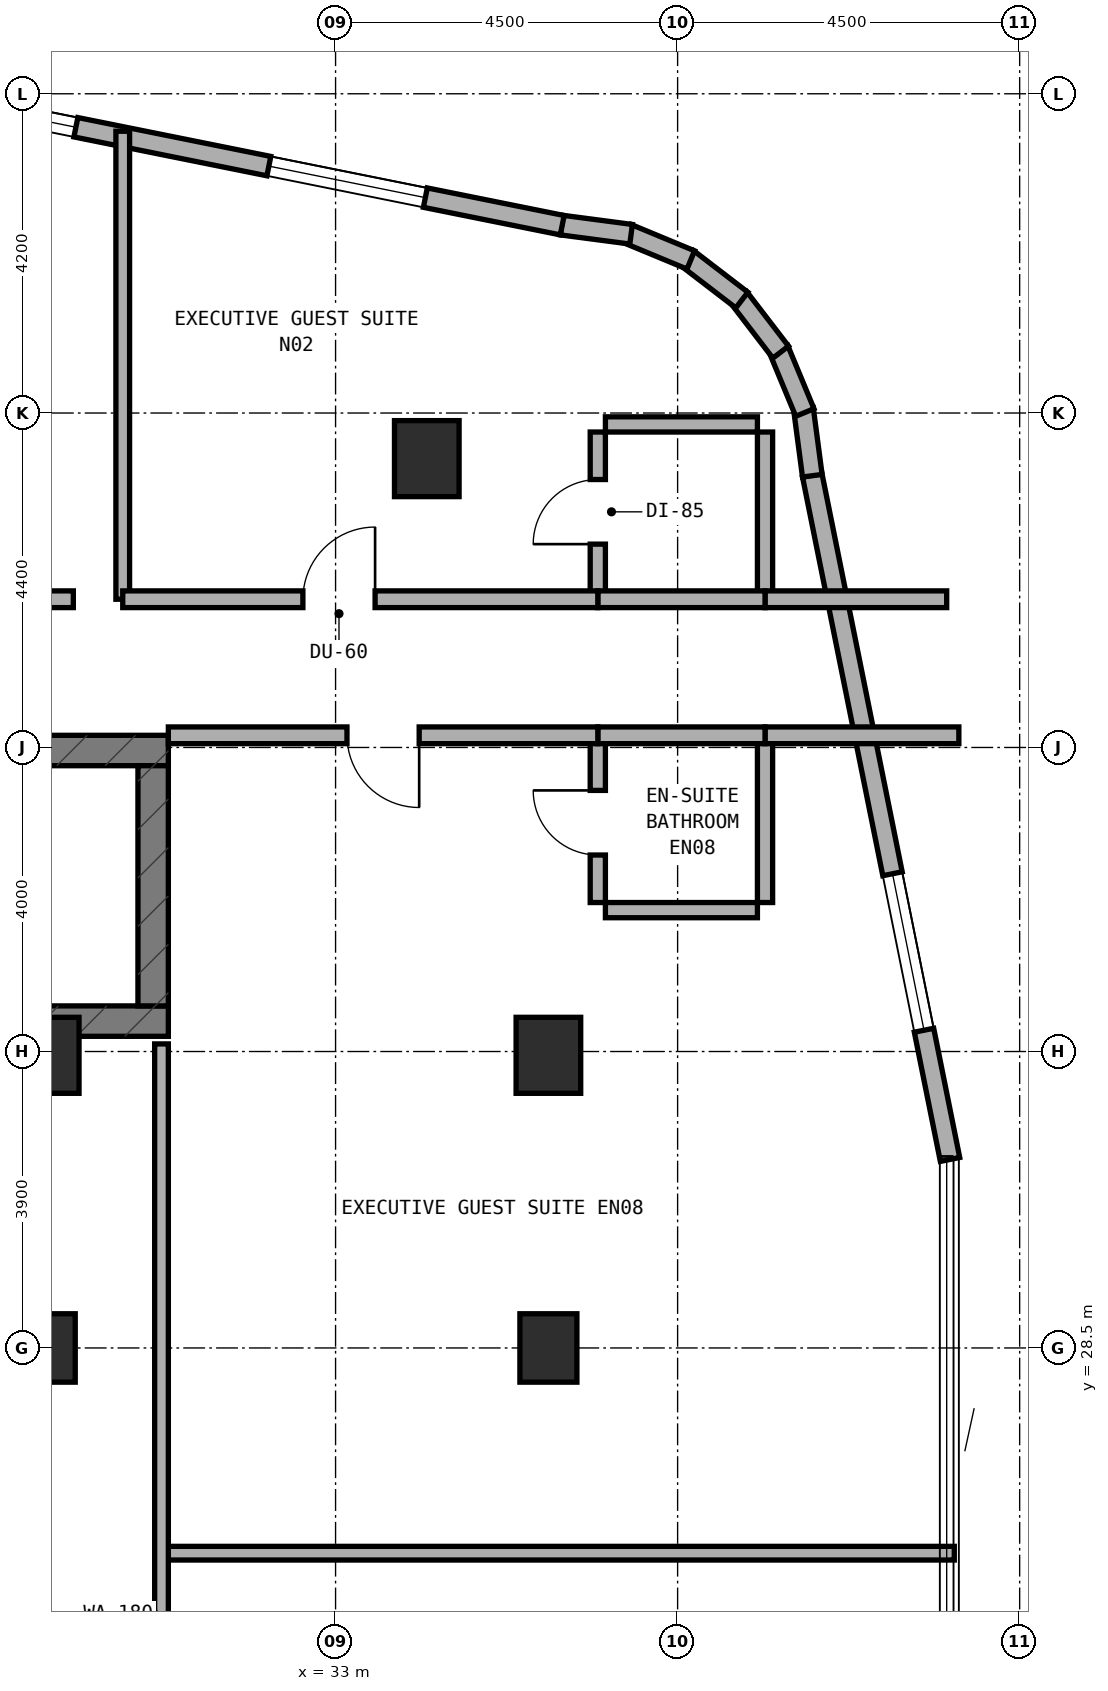
"""IFC4 building model, lengths in metres.
Left out: names, types, materials, properties, quantities, classifications, styles, units other than length and angle.
Written with IfcOpenShell. Run it as: python <this file> out.ifc"""

import sys

from ifc_helpers import new_model, si_unit, direction, frame, frame_2d, origin, origin_2d, place, context, subcontext, project, spatial, rectangle, extrude, element, fill, save


model = new_model("IFC4")
c1 = context("Model", 3, precision=1e-05, world=origin(), true_north=direction((0.0, 1.0)))
c2 = subcontext(c1, "Body", "Model", "MODEL_VIEW")
j1 = project(units=[si_unit("LENGTHUNIT", "METRE"), si_unit("PLANEANGLEUNIT", "RADIAN")], contexts=[c1])
p1 = place(None, origin())
s1 = spatial("IfcSite", under=j1, at=p1, CompositionType="ELEMENT")
p2 = place(p1, origin())
s2 = spatial("IfcBuilding", under=s1, at=p2, CompositionType="ELEMENT")
p3 = place(p2, frame((0.0, 0.0, 169.5)))
s3 = spatial("IfcBuildingStorey", under=s2, at=p3, CompositionType="ELEMENT", Elevation=169.5)
p4 = place(p3, frame((6.4, 32.8, 0.0), z_axis=(0.0, 0.0, 1.0), x_axis=(1.0, 0.0, 0.0)))
e1 = element("IfcWall", 1, at=p4, inside=s3, PredefinedType="SHEAR", context=c2, shape_type="SweptSolid", body=[
    extrude(rectangle(XDim=24.4, YDim=0.4, at=frame_2d((12.2, 0.0))), origin(), (0.0, 0.0, 1.0), 3.5),
])
p5 = place(p4, frame((6.05, 0.0, 0.0)))
e2 = element("IfcOpeningElement", 2, at=p5, cuts=e1, PredefinedType="OPENING", context=c2, shape_type="SweptSolid", body=[
    extrude(rectangle(XDim=1.1, YDim=2.15, at=frame_2d((0.55, 1.075))), frame((0.0, 0.21, 0.0), z_axis=(0.0, -1.0, 0.0), x_axis=(1.0, 0.0, 0.0)), (0.0, 0.0, 1.0), 0.42),
])
p6 = place(p3, frame((6.4, 36.36, 0.0), z_axis=(0.0, 0.0, 1.0), x_axis=(1.0, 0.0, 0.0)))
e3 = element("IfcWall", 3, at=p6, inside=s3, PredefinedType="SHEAR", context=c2, shape_type="SweptSolid", body=[
    extrude(rectangle(XDim=24.4, YDim=0.4, at=frame_2d((12.2, 0.0))), origin(), (0.0, 0.0, 1.0), 3.5),
])
p7 = place(p6, frame((9.15, 0.0, 0.0)))
e4 = element("IfcOpeningElement", 4, at=p7, cuts=e3, PredefinedType="OPENING", context=c2, shape_type="SweptSolid", body=[
    extrude(rectangle(XDim=1.2, YDim=2.15, at=frame_2d((0.6, 1.075))), frame((0.0, 0.21, 0.0), z_axis=(0.0, -1.0, 0.0), x_axis=(1.0, 0.0, 0.0)), (0.0, 0.0, 1.0), 0.42),
])
p8 = place(p6, frame((19.2, 0.0, 0.0)))
e5 = element("IfcOpeningElement", 5, at=p8, cuts=e3, PredefinedType="OPENING", context=c2, shape_type="SweptSolid", body=[
    extrude(rectangle(XDim=0.85, YDim=2.1, at=frame_2d((0.425, 1.05))), frame((0.0, 0.21, 0.0), z_axis=(0.0, -1.0, 0.0), x_axis=(1.0, 0.0, 0.0)), (0.0, 0.0, 1.0), 0.42),
])
p9 = place(p6, frame((16.94, 0.0, 0.0)))
e6 = element("IfcOpeningElement", 6, at=p9, cuts=e3, PredefinedType="OPENING", context=c2, shape_type="SweptSolid", body=[
    extrude(rectangle(XDim=0.85, YDim=2.1, at=frame_2d((0.425, 1.05))), frame((0.0, 0.21, 0.0), z_axis=(0.0, -1.0, 0.0), x_axis=(1.0, 0.0, 0.0)), (0.0, 0.0, 1.0), 0.42),
])
p10 = place(p3, frame((30.6, 33.0, 0.0), z_axis=(0.0, 0.0, 1.0), x_axis=(0.0, 1.0, 0.0)))
e7 = element("IfcWall", 7, at=p10, inside=s3, PredefinedType="SHEAR", context=c2, shape_type="SweptSolid", body=[
    extrude(rectangle(XDim=3.16, YDim=0.4, at=frame_2d((1.58, 0.0))), origin(), (0.0, 0.0, 1.0), 3.5),
])
p11 = place(p3, frame((34.2, 40.2, 0.0), z_axis=(0.0, 0.0, 1.0), x_axis=(1.0, 0.0, 0.0)))
e8 = element("IfcColumn", 8, at=p11, inside=s3, PredefinedType="COLUMN", context=c2, shape_type="SweptSolid", body=[
    extrude(rectangle(XDim=0.85, YDim=1.0, at=origin_2d()), origin(), (0.0, 0.0, 1.0), 3.5),
])
p12 = place(p3, frame((35.8, 28.5, 0.0), z_axis=(0.0, 0.0, 1.0), x_axis=(1.0, 0.0, 0.0)))
e9 = element("IfcColumn", 9, at=p12, inside=s3, PredefinedType="COLUMN", context=c2, shape_type="SweptSolid", body=[
    extrude(rectangle(XDim=0.75, YDim=0.9, at=origin_2d()), origin(), (0.0, 0.0, 1.0), 3.5),
])
for number, where, z_axis, x_axis in (
    (10, (35.8, 32.35, 0.0), (0.0, 0.0, 1.0), (1.0, 0.0, 0.0)),
    (11, (29.2, 32.35, 0.0), (0.0, 0.0, 1.0), (1.0, 0.0, 0.0)),
):
    element("IfcColumn", number, at=place(p3, frame(where, z_axis=z_axis, x_axis=x_axis)), inside=s3, PredefinedType="COLUMN", context=c2, shape_type="SweptSolid", body=[
        extrude(rectangle(XDim=0.85, YDim=1.0, at=origin_2d()), origin(), (0.0, 0.0, 1.0), 3.5),
    ])
p13 = place(p3, frame((29.2, 28.5, 0.0), z_axis=(0.0, 0.0, 1.0), x_axis=(1.0, 0.0, 0.0)))
e12 = element("IfcColumn", 12, at=p13, inside=s3, PredefinedType="COLUMN", context=c2, shape_type="SweptSolid", body=[
    extrude(rectangle(XDim=0.75, YDim=0.9, at=origin_2d()), origin(), (0.0, 0.0, 1.0), 3.5),
])
p14 = place(p3, frame((41.084, 30.98, 0.0), z_axis=(0.0, 0.0, 1.0), x_axis=(-0.197435082048, 0.980315963543, 0.0)))
e13 = element("IfcWall", 13, at=p14, inside=s3, PredefinedType="STANDARD", context=c2, shape_type="SweptSolid", body=[
    extrude(rectangle(XDim=9.183, YDim=0.26, at=frame_2d((4.591, 0.0))), origin(), (0.0, 0.0, 1.0), 3.18),
])
p15 = place(p14, frame((1.734, 0.0, 0.85)))
e14 = element("IfcOpeningElement", 14, at=p15, cuts=e13, PredefinedType="OPENING", context=c2, shape_type="SweptSolid", body=[
    extrude(rectangle(XDim=2.1, YDim=1.5, at=frame_2d((1.05, 0.75))), frame((0.0, 0.14, 0.0), z_axis=(0.0, -1.0, 0.0), x_axis=(1.0, 0.0, 0.0)), (0.0, 0.0, 1.0), 0.28),
])
p16 = place(p3, frame((39.272, 39.975, 0.0), z_axis=(0.0, 0.0, 1.0), x_axis=(-0.130953706898, 0.991388484223, 0.0)))
e15 = element("IfcWall", 15, at=p16, inside=s3, PredefinedType="STANDARD", context=c2, shape_type="SweptSolid", body=[
    extrude(rectangle(XDim=0.885, YDim=0.26, at=frame_2d((0.443, 0.0))), origin(), (0.0, 0.0, 1.0), 3.18),
])
p17 = place(p3, frame((39.174, 40.807, 0.0), z_axis=(0.0, 0.0, 1.0), x_axis=(-0.383290660547, 0.923627776508, 0.0)))
e16 = element("IfcWall", 16, at=p17, inside=s3, PredefinedType="STANDARD", context=c2, shape_type="SweptSolid", body=[
    extrude(rectangle(XDim=0.903, YDim=0.26, at=frame_2d((0.452, 0.0))), origin(), (0.0, 0.0, 1.0), 3.18),
])
p18 = place(p3, frame((38.856, 41.601, 0.0), z_axis=(0.0, 0.0, 1.0), x_axis=(-0.608624690463, 0.793458244748, 0.0)))
e17 = element("IfcWall", 17, at=p18, inside=s3, PredefinedType="STANDARD", context=c2, shape_type="SweptSolid", body=[
    extrude(rectangle(XDim=0.902, YDim=0.26, at=frame_2d((0.451, 0.0))), origin(), (0.0, 0.0, 1.0), 3.18),
])
p19 = place(p3, frame((38.345, 42.286, 0.0), z_axis=(0.0, 0.0, 1.0), x_axis=(-0.793558456666, 0.608494022858, 0.0)))
e18 = element("IfcWall", 18, at=p19, inside=s3, PredefinedType="STANDARD", context=c2, shape_type="SweptSolid", body=[
    extrude(rectangle(XDim=0.902, YDim=0.26, at=frame_2d((0.451, 0.0))), origin(), (0.0, 0.0, 1.0), 3.18),
])
p20 = place(p3, frame((37.673, 42.814, 0.0), z_axis=(0.0, 0.0, 1.0), x_axis=(-0.923683767999, 0.383155708213, 0.0)))
e19 = element("IfcWall", 19, at=p20, inside=s3, PredefinedType="STANDARD", context=c2, shape_type="SweptSolid", body=[
    extrude(rectangle(XDim=0.903, YDim=0.26, at=frame_2d((0.451, 0.0))), origin(), (0.0, 0.0, 1.0), 3.18),
])
p21 = place(p3, frame((36.888, 43.152, 0.0), z_axis=(0.0, 0.0, 1.0), x_axis=(-0.991487658083, 0.130200706103, 0.0)))
e20 = element("IfcWall", 20, at=p21, inside=s3, PredefinedType="STANDARD", context=c2, shape_type="SweptSolid", body=[
    extrude(rectangle(XDim=0.921, YDim=0.26, at=frame_2d((0.46, 0.0))), origin(), (0.0, 0.0, 1.0), 3.18),
])
p22 = place(p3, frame((35.982, 43.271, 0.0), z_axis=(0.0, 0.0, 1.0), x_axis=(-0.980315963543, 0.197435082048, 0.0)))
e21 = element("IfcWall", 21, at=p22, inside=s3, PredefinedType="STANDARD", context=c2, shape_type="SweptSolid", body=[
    extrude(rectangle(XDim=9.183, YDim=0.26, at=frame_2d((4.591, 0.0))), origin(), (0.0, 0.0, 1.0), 3.18),
])
p23 = place(p22, frame((1.837, 0.0, 0.85)))
e22 = element("IfcOpeningElement", 22, at=p23, cuts=e21, PredefinedType="OPENING", context=c2, shape_type="SweptSolid", body=[
    extrude(rectangle(XDim=2.1, YDim=1.5, at=frame_2d((1.05, 0.75))), frame((0.0, 0.14, 0.0), z_axis=(0.0, -1.0, 0.0), x_axis=(1.0, 0.0, 0.0)), (0.0, 0.0, 1.0), 0.28),
])
p24 = place(p22, frame((6.527, 0.0, 0.85)))
e23 = element("IfcOpeningElement", 23, at=p24, cuts=e21, PredefinedType="OPENING", context=c2, shape_type="SweptSolid", body=[
    extrude(rectangle(XDim=2.1, YDim=1.5, at=frame_2d((1.05, 0.75))), frame((0.0, 0.14, 0.0), z_axis=(0.0, -1.0, 0.0), x_axis=(1.0, 0.0, 0.0)), (0.0, 0.0, 1.0), 0.28),
])
p25 = place(p3, frame((23.65, 38.35, 0.0), z_axis=(0.0, 0.0, 1.0), x_axis=(1.0, 0.0, 0.0)))
e24 = element("IfcWall", 24, at=p25, inside=s3, PredefinedType="SOLIDWALL", context=c2, shape_type="SweptSolid", body=[
    extrude(rectangle(XDim=5.9, YDim=0.22, at=frame_2d((2.95, 0.0))), origin(), (0.0, 0.0, 1.0), 2.855),
])
p26 = place(p25, frame((2.15, 0.0, 0.0)))
e25 = element("IfcOpeningElement", 25, at=p26, cuts=e24, PredefinedType="OPENING", context=c2, shape_type="SweptSolid", body=[
    extrude(rectangle(XDim=1.1, YDim=2.1, at=frame_2d((0.55, 1.05))), frame((0.0, 0.12, 0.0), z_axis=(0.0, -1.0, 0.0), x_axis=(1.0, 0.0, 0.0)), (0.0, 0.0, 1.0), 0.24),
])
p27 = place(p3, frame((30.2, 38.35, 0.0), z_axis=(0.0, 0.0, 1.0), x_axis=(0.0, 1.0, 0.0)))
e26 = element("IfcWall", 26, at=p27, inside=s3, PredefinedType="SOLIDWALL", context=c2, shape_type="SweptSolid", body=[
    extrude(rectangle(XDim=6.157, YDim=0.18, at=frame_2d((3.079, 0.0))), origin(), (0.0, 0.0, 1.0), 2.795),
])
p28 = place(p3, frame((36.45, 38.45, 0.0), z_axis=(0.0, 0.0, 1.0), x_axis=(0.0, 1.0, 0.0)))
e27 = element("IfcWall", 27, at=p28, inside=s3, PredefinedType="PLUMBINGWALL", context=c2, shape_type="SweptSolid", body=[
    extrude(rectangle(XDim=2.1, YDim=0.2, at=frame_2d((1.05, 0.0))), origin(), (0.0, 0.0, 1.0), 3.18),
])
p29 = place(p28, frame((0.625, 0.0, 0.0)))
e28 = element("IfcOpeningElement", 28, at=p29, cuts=e27, PredefinedType="OPENING", context=c2, shape_type="SweptSolid", body=[
    extrude(rectangle(XDim=0.85, YDim=2.1, at=frame_2d((0.425, 1.05))), frame((0.0, 0.11, 0.0), z_axis=(0.0, -1.0, 0.0), x_axis=(1.0, 0.0, 0.0)), (0.0, 0.0, 1.0), 0.22),
])
p30 = place(p3, frame((36.55, 40.65, 0.0), z_axis=(0.0, 0.0, 1.0), x_axis=(1.0, 0.0, 0.0)))
e29 = element("IfcWall", 29, at=p30, inside=s3, PredefinedType="PLUMBINGWALL", context=c2, shape_type="SweptSolid", body=[
    extrude(rectangle(XDim=2.0, YDim=0.2, at=frame_2d((1.0, 0.0))), origin(), (0.0, 0.0, 1.0), 3.18),
])
p31 = place(p3, frame((38.65, 38.45, 0.0), z_axis=(0.0, 0.0, 1.0), x_axis=(0.0, 1.0, 0.0)))
e30 = element("IfcWall", 30, at=p31, inside=s3, PredefinedType="PLUMBINGWALL", context=c2, shape_type="SweptSolid", body=[
    extrude(rectangle(XDim=2.1, YDim=0.2, at=frame_2d((1.05, 0.0))), origin(), (0.0, 0.0, 1.0), 3.18),
])
p32 = place(p3, frame((38.65, 38.35, 0.0), z_axis=(0.0, 0.0, 1.0), x_axis=(1.0, 0.0, 0.0)))
e31 = element("IfcWall", 31, at=p32, inside=s3, PredefinedType="SOLIDWALL", context=c2, shape_type="SweptSolid", body=[
    extrude(rectangle(XDim=2.39, YDim=0.22, at=frame_2d((1.195, 0.0))), origin(), (0.0, 0.0, 1.0), 3.18),
])
p33 = place(p3, frame((36.45, 38.35, 0.0), z_axis=(0.0, 0.0, 1.0), x_axis=(1.0, 0.0, 0.0)))
e32 = element("IfcWall", 32, at=p33, inside=s3, PredefinedType="SOLIDWALL", context=c2, shape_type="SweptSolid", body=[
    extrude(rectangle(XDim=2.2, YDim=0.22, at=frame_2d((1.1, 0.0))), origin(), (0.0, 0.0, 1.0), 3.18),
])
p34 = place(p3, frame((30.2, 38.35, 0.0), z_axis=(0.0, 0.0, 1.0), x_axis=(1.0, 0.0, 0.0)))
e33 = element("IfcWall", 33, at=p34, inside=s3, PredefinedType="SOLIDWALL", context=c2, shape_type="SweptSolid", body=[
    extrude(rectangle(XDim=6.25, YDim=0.22, at=frame_2d((3.125, 0.0))), origin(), (0.0, 0.0, 1.0), 2.795),
])
p35 = place(p34, frame((2.37, 0.0, 0.0)))
e34 = element("IfcOpeningElement", 34, at=p35, cuts=e33, PredefinedType="OPENING", context=c2, shape_type="SweptSolid", body=[
    extrude(rectangle(XDim=0.95, YDim=2.1, at=frame_2d((0.475, 1.05))), frame((0.0, 0.12, 0.0), z_axis=(0.0, -1.0, 0.0), x_axis=(1.0, 0.0, 0.0)), (0.0, 0.0, 1.0), 0.24),
])
p36 = place(p3, frame((30.8, 25.8, 0.0), z_axis=(0.0, 0.0, 1.0), x_axis=(1.0, 0.0, 0.0)))
e35 = element("IfcWall", 35, at=p36, inside=s3, PredefinedType="SOLIDWALL", context=c2, shape_type="SweptSolid", body=[
    extrude(rectangle(XDim=10.34, YDim=0.18, at=frame_2d((5.17, 0.0))), origin(), (0.0, 0.0, 1.0), 2.795),
])
p37 = place(p3, frame((30.71, 17.5, 0.0), z_axis=(0.0, 0.0, 1.0), x_axis=(0.0, 1.0, 0.0)))
e36 = element("IfcWall", 36, at=p37, inside=s3, PredefinedType="SOLIDWALL", context=c2, shape_type="SweptSolid", body=[
    extrude(rectangle(XDim=15.0, YDim=0.18, at=frame_2d((7.5, 0.0))), origin(), (0.0, 0.0, 1.0), 2.855),
])
p38 = place(p3, frame((36.45, 34.36, 0.0), z_axis=(0.0, 0.0, 1.0), x_axis=(0.0, 1.0, 0.0)))
e37 = element("IfcWall", 37, at=p38, inside=s3, PredefinedType="PLUMBINGWALL", context=c2, shape_type="SweptSolid", body=[
    extrude(rectangle(XDim=2.1, YDim=0.2, at=frame_2d((1.05, 0.0))), origin(), (0.0, 0.0, 1.0), 3.18),
])
p39 = place(p38, frame((0.625, 0.0, 0.0)))
e38 = element("IfcOpeningElement", 38, at=p39, cuts=e37, PredefinedType="OPENING", context=c2, shape_type="SweptSolid", body=[
    extrude(rectangle(XDim=0.85, YDim=2.1, at=frame_2d((0.425, 1.05))), frame((0.0, 0.11, 0.0), z_axis=(0.0, -1.0, 0.0), x_axis=(1.0, 0.0, 0.0)), (0.0, 0.0, 1.0), 0.22),
])
p40 = place(p3, frame((36.55, 34.26, 0.0), z_axis=(0.0, 0.0, 1.0), x_axis=(1.0, 0.0, 0.0)))
e39 = element("IfcWall", 39, at=p40, inside=s3, PredefinedType="PLUMBINGWALL", context=c2, shape_type="SweptSolid", body=[
    extrude(rectangle(XDim=2.0, YDim=0.2, at=frame_2d((1.0, 0.0))), origin(), (0.0, 0.0, 1.0), 3.18),
])
p41 = place(p3, frame((38.65, 34.36, 0.0), z_axis=(0.0, 0.0, 1.0), x_axis=(0.0, 1.0, 0.0)))
e40 = element("IfcWall", 40, at=p41, inside=s3, PredefinedType="PLUMBINGWALL", context=c2, shape_type="SweptSolid", body=[
    extrude(rectangle(XDim=2.1, YDim=0.2, at=frame_2d((1.05, 0.0))), origin(), (0.0, 0.0, 1.0), 3.18),
])
p42 = place(p3, frame((38.65, 36.56, 0.0), z_axis=(0.0, 0.0, 1.0), x_axis=(1.0, 0.0, 0.0)))
e41 = element("IfcWall", 41, at=p42, inside=s3, PredefinedType="SOLIDWALL", context=c2, shape_type="SweptSolid", body=[
    extrude(rectangle(XDim=2.55, YDim=0.22, at=frame_2d((1.275, 0.0))), origin(), (0.0, 0.0, 1.0), 3.18),
])
p43 = place(p3, frame((36.45, 36.56, 0.0), z_axis=(0.0, 0.0, 1.0), x_axis=(1.0, 0.0, 0.0)))
e42 = element("IfcWall", 42, at=p43, inside=s3, PredefinedType="SOLIDWALL", context=c2, shape_type="SweptSolid", body=[
    extrude(rectangle(XDim=2.2, YDim=0.22, at=frame_2d((1.1, 0.0))), origin(), (0.0, 0.0, 1.0), 3.18),
])
p44 = place(p3, frame((30.8, 36.56, 0.0), z_axis=(0.0, 0.0, 1.0), x_axis=(1.0, 0.0, 0.0)))
e43 = element("IfcWall", 43, at=p44, inside=s3, PredefinedType="SOLIDWALL", context=c2, shape_type="SweptSolid", body=[
    extrude(rectangle(XDim=5.65, YDim=0.22, at=frame_2d((2.825, 0.0))), origin(), (0.0, 0.0, 1.0), 2.795),
])
p45 = place(p44, frame((2.35, 0.0, 0.0)))
e44 = element("IfcOpeningElement", 44, at=p45, cuts=e43, PredefinedType="OPENING", context=c2, shape_type="SweptSolid", body=[
    extrude(rectangle(XDim=0.95, YDim=2.1, at=frame_2d((0.475, 1.05))), frame((0.0, 0.12, 0.0), z_axis=(0.0, -1.0, 0.0), x_axis=(1.0, 0.0, 0.0)), (0.0, 0.0, 1.0), 0.24),
])
p46 = place(p15, origin())
e45 = element("IfcWindow", 45, at=p46, inside=s3, PartitioningType="SINGLE_PANEL", PredefinedType="WINDOW", context=c2, shape_type="SweptSolid", body=[
    extrude(rectangle(XDim=2.1, YDim=1.5, at=frame_2d((1.05, 0.75))), frame((0.0, 0.03, 0.0), z_axis=(0.0, -1.0, 0.0), x_axis=(1.0, 0.0, 0.0)), (0.0, 0.0, 1.0), 0.06),
])
fill(e14, e45)
p47 = place(p23, origin())
e46 = element("IfcWindow", 46, at=p47, inside=s3, PartitioningType="SINGLE_PANEL", PredefinedType="WINDOW", context=c2, shape_type="SweptSolid", body=[
    extrude(rectangle(XDim=2.1, YDim=1.5, at=frame_2d((1.05, 0.75))), frame((0.0, 0.03, 0.0), z_axis=(0.0, -1.0, 0.0), x_axis=(1.0, 0.0, 0.0)), (0.0, 0.0, 1.0), 0.06),
])
fill(e22, e46)
p48 = place(p24, origin())
e47 = element("IfcWindow", 47, at=p48, inside=s3, PartitioningType="SINGLE_PANEL", PredefinedType="WINDOW", context=c2, shape_type="SweptSolid", body=[
    extrude(rectangle(XDim=2.1, YDim=1.5, at=frame_2d((1.05, 0.75))), frame((0.0, 0.03, 0.0), z_axis=(0.0, -1.0, 0.0), x_axis=(1.0, 0.0, 0.0)), (0.0, 0.0, 1.0), 0.06),
])
fill(e23, e47)
p49 = place(p29, origin())
e48 = element("IfcDoor", 48, at=p49, inside=s3, OperationType="SINGLE_SWING_LEFT", PredefinedType="DOOR", context=c2, shape_type="SweptSolid", body=[
    extrude(rectangle(XDim=0.85, YDim=2.1, at=frame_2d((0.425, 1.05))), frame((0.0, 0.025, 0.0), z_axis=(0.0, -1.0, 0.0), x_axis=(1.0, 0.0, 0.0)), (0.0, 0.0, 1.0), 0.05),
])
fill(e28, e48)
p50 = place(p35, origin())
e49 = element("IfcDoor", 49, at=p50, inside=s3, OperationType="SINGLE_SWING_RIGHT", PredefinedType="DOOR", context=c2, shape_type="SweptSolid", body=[
    extrude(rectangle(XDim=0.95, YDim=2.1, at=frame_2d((0.475, 1.05))), frame((0.0, 0.025, 0.0), z_axis=(0.0, -1.0, 0.0), x_axis=(1.0, 0.0, 0.0)), (0.0, 0.0, 1.0), 0.05),
])
fill(e34, e49)
p51 = place(p39, origin())
e50 = element("IfcDoor", 50, at=p51, inside=s3, OperationType="SINGLE_SWING_RIGHT", PredefinedType="DOOR", context=c2, shape_type="SweptSolid", body=[
    extrude(rectangle(XDim=0.85, YDim=2.1, at=frame_2d((0.425, 1.05))), frame((0.0, 0.025, 0.0), z_axis=(0.0, -1.0, 0.0), x_axis=(1.0, 0.0, 0.0)), (0.0, 0.0, 1.0), 0.05),
])
fill(e38, e50)
p52 = place(p45, frame((0.95, 0.0, 0.0), z_axis=(0.0, 0.0, 1.0), x_axis=(-1.0, 0.0, 0.0)))
e51 = element("IfcDoor", 51, at=p52, inside=s3, OperationType="SINGLE_SWING_LEFT", PredefinedType="DOOR", context=c2, shape_type="SweptSolid", body=[
    extrude(rectangle(XDim=0.95, YDim=2.1, at=frame_2d((0.475, 1.05))), frame((0.0, 0.025, 0.0), z_axis=(0.0, -1.0, 0.0), x_axis=(1.0, 0.0, 0.0)), (0.0, 0.0, 1.0), 0.05),
])
fill(e44, e51)
save(model, sys.argv[1])
